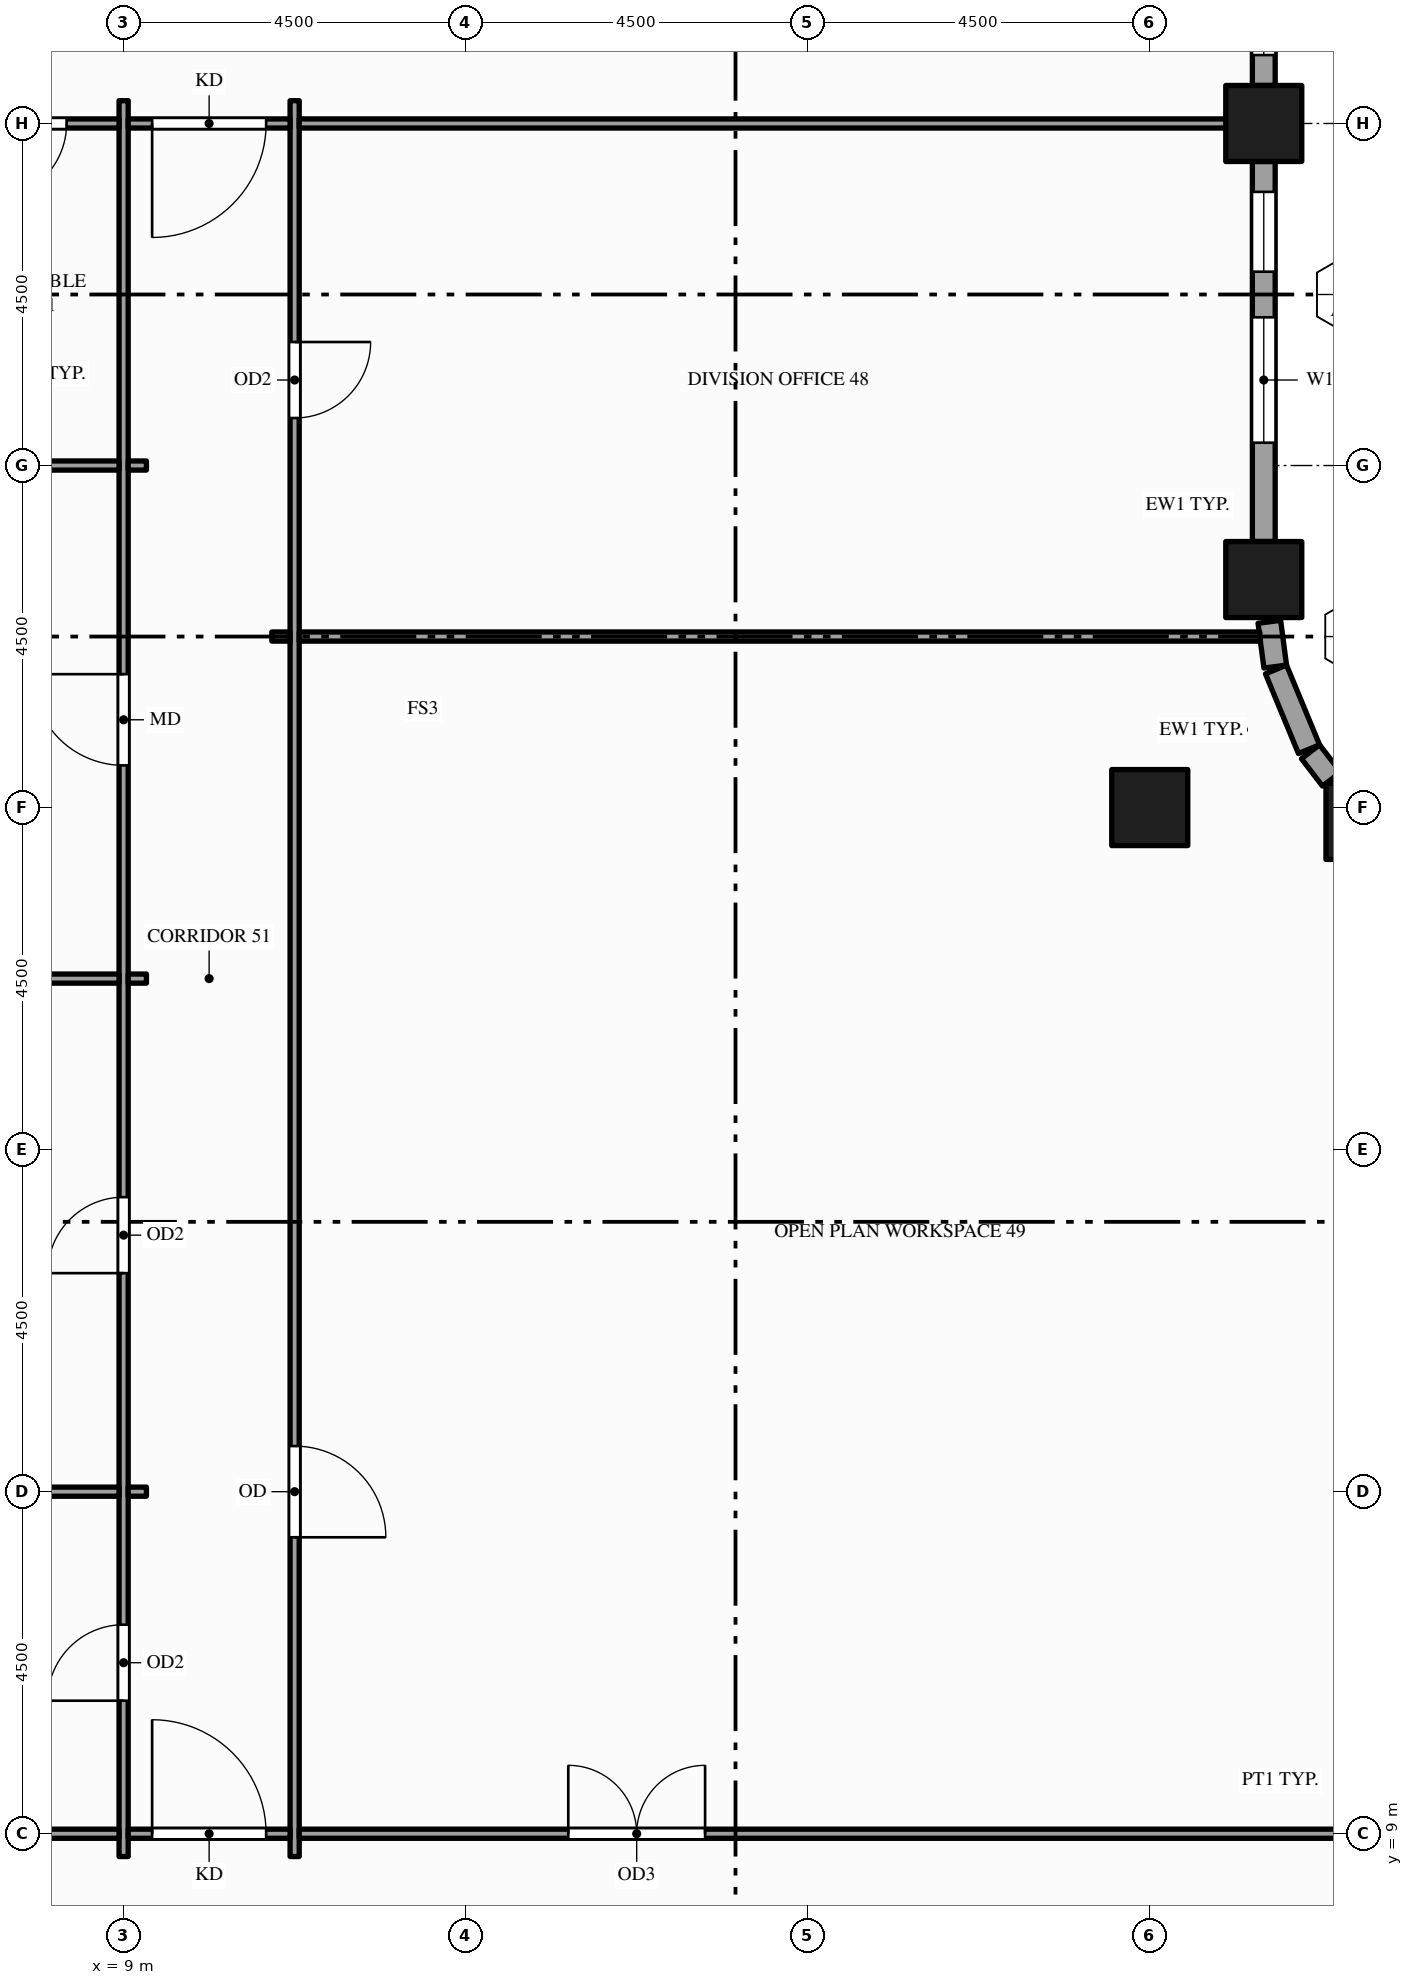
"""IFC4 building model, lengths in metres.
Left out: names, types, materials, properties, quantities, classifications, styles, units other than length and angle.
Written with IfcOpenShell. Run it as: python <this file> out.ifc"""

import sys

from ifc_helpers import new_model, si_unit, direction, frame, frame_2d, origin, origin_2d, place, context, subcontext, project, spatial, rectangle, hollow_rectangle, extrude, element, fill, save


model = new_model("IFC4")
c1 = context("Model", 3, precision=1e-05, world=origin(), true_north=direction((0.0, 1.0)))
c2 = subcontext(c1, "Body", "Model", "MODEL_VIEW")
j1 = project(units=[si_unit("LENGTHUNIT", "METRE"), si_unit("PLANEANGLEUNIT", "RADIAN")], contexts=[c1])
p1 = place(None, origin())
s1 = spatial("IfcSite", under=j1, at=p1, CompositionType="ELEMENT")
p2 = place(p1, origin())
s2 = spatial("IfcBuilding", under=s1, at=p2, CompositionType="ELEMENT")
p3 = place(p2, frame((0.0, 0.0, 103.0)))
s3 = spatial("IfcBuildingStorey", under=s2, at=p3, CompositionType="ELEMENT", Elevation=103.0)
for number, where, z_axis, x_axis in (
    (1, (22.5, 22.5, -0.15), (0.0, 0.0, 1.0), (1.0, 0.0, 0.0)),
    (2, (24.0, 25.5, -0.15), (0.0, 0.0, 1.0), (1.0, 0.0, 0.0)),
    (3, (24.0, 31.5, -0.15), (0.0, 0.0, 1.0), (1.0, 0.0, 0.0)),
    (4, (25.318, 22.318, -0.15), (0.0, 0.0, 1.0), (1.0, 0.0, 0.0)),
):
    element("IfcColumn", number, at=place(p3, frame(where, z_axis=z_axis, x_axis=x_axis)), inside=s3, PredefinedType="COLUMN", context=c2, shape_type="SweptSolid", body=[
        extrude(hollow_rectangle(XDim=1.0, YDim=1.0, WallThickness=0.05, at=origin_2d()), origin(), (0.0, 0.0, 1.0), 4.0),
    ])
p4 = place(p3, frame((24.891, 22.874, 0.0), z_axis=(0.0, 0.0, 1.0), x_axis=(-0.608488016104, 0.793563062559, 0.0)))
e5 = element("IfcWall", 5, at=p4, inside=s3, PredefinedType="STANDARD", context=c2, shape_type="SweptSolid", body=[
    extrude(rectangle(XDim=0.454, YDim=0.3, at=frame_2d((0.227, 0.0))), origin(), (0.0, 0.0, 1.0), 2.76),
])
p5 = place(p3, frame((24.595, 23.268, 0.0), z_axis=(0.0, 0.0, 1.0), x_axis=(-0.382598720491, 0.923914616768, 0.0)))
e6 = element("IfcWall", 6, at=p5, inside=s3, PredefinedType="STANDARD", context=c2, shape_type="SweptSolid", body=[
    extrude(rectangle(XDim=1.135, YDim=0.3, at=frame_2d((0.568, 0.0))), origin(), (0.0, 0.0, 1.0), 3.154),
])
p6 = place(p3, frame((24.151, 24.355, 0.0), z_axis=(0.0, 0.0, 1.0), x_axis=(-0.130709692412, 0.991420685839, 0.0)))
e7 = element("IfcWall", 7, at=p6, inside=s3, PredefinedType="STANDARD", context=c2, shape_type="SweptSolid", body=[
    extrude(rectangle(XDim=0.594, YDim=0.3, at=frame_2d((0.297, 0.0))), origin(), (0.0, 0.0, 1.0), 3.154),
])
p7 = place(p3, frame((24.0, 26.0, 0.0), z_axis=(0.0, 0.0, 1.0), x_axis=(0.0, 1.0, 0.0)))
e8 = element("IfcWall", 8, at=p7, inside=s3, PredefinedType="STANDARD", context=c2, shape_type="SweptSolid", body=[
    extrude(rectangle(XDim=5.0, YDim=0.3, at=frame_2d((2.5, 0.0))), origin(), (0.0, 0.0, 1.0), 3.154),
])
p8 = place(p7, frame((1.3, 0.0, 0.9)))
e9 = element("IfcOpeningElement", 9, at=p8, cuts=e8, PredefinedType="OPENING", context=c2, shape_type="SweptSolid", body=[
    extrude(rectangle(XDim=1.65, YDim=2.0, at=frame_2d((0.825, 1.0))), frame((0.0, 0.16, 0.0), z_axis=(0.0, -1.0, 0.0), x_axis=(1.0, 0.0, 0.0)), (0.0, 0.0, 1.0), 0.32),
])
p9 = place(p7, frame((3.55, 0.0, 0.9)))
e10 = element("IfcOpeningElement", 10, at=p9, cuts=e8, PredefinedType="OPENING", context=c2, shape_type="SweptSolid", body=[
    extrude(rectangle(XDim=1.05, YDim=2.0, at=frame_2d((0.525, 1.0))), frame((0.0, 0.16, 0.0), z_axis=(0.0, -1.0, 0.0), x_axis=(1.0, 0.0, 0.0)), (0.0, 0.0, 1.0), 0.32),
])
p10 = place(p3, frame((24.0, 32.0, 0.0), z_axis=(0.0, 0.0, 1.0), x_axis=(0.0, 1.0, 0.0)))
e11 = element("IfcWall", 11, at=p10, inside=s3, PredefinedType="STANDARD", context=c2, shape_type="SweptSolid", body=[
    extrude(rectangle(XDim=3.5, YDim=0.3, at=frame_2d((1.75, 0.0))), origin(), (0.0, 0.0, 1.0), 3.154),
])
p11 = place(p10, frame((0.4, 0.0, 0.9)))
e12 = element("IfcOpeningElement", 12, at=p11, cuts=e11, PredefinedType="OPENING", context=c2, shape_type="SweptSolid", body=[
    extrude(rectangle(XDim=1.05, YDim=2.0, at=frame_2d((0.525, 1.0))), frame((0.0, 0.16, 0.0), z_axis=(0.0, -1.0, 0.0), x_axis=(1.0, 0.0, 0.0)), (0.0, 0.0, 1.0), 0.32),
])
p12 = place(p10, frame((2.05, 0.0, 0.9)))
e13 = element("IfcOpeningElement", 13, at=p12, cuts=e11, PredefinedType="OPENING", context=c2, shape_type="SweptSolid", body=[
    extrude(rectangle(XDim=1.05, YDim=2.0, at=frame_2d((0.525, 1.0))), frame((0.0, 0.16, 0.0), z_axis=(0.0, -1.0, 0.0), x_axis=(1.0, 0.0, 0.0)), (0.0, 0.0, 1.0), 0.32),
])
p13 = place(p3, frame((9.0, 8.7, 0.0), z_axis=(0.0, 0.0, 1.0), x_axis=(0.0, 1.0, 0.0)))
e14 = element("IfcWall", 14, at=p13, inside=s3, PredefinedType="PARTITIONING", context=c2, shape_type="SweptSolid", body=[
    extrude(rectangle(XDim=23.1, YDim=0.12, at=frame_2d((11.55, 0.0))), origin(), (0.0, 0.0, 1.0), 2.6),
])
p14 = place(p13, frame((2.05, 0.0, 0.0)))
e15 = element("IfcOpeningElement", 15, at=p14, cuts=e14, PredefinedType="OPENING", context=c2, shape_type="SweptSolid", body=[
    extrude(rectangle(XDim=1.0, YDim=2.1, at=frame_2d((0.5, 1.05))), frame((0.0, 0.07, 0.0), z_axis=(0.0, -1.0, 0.0), x_axis=(1.0, 0.0, 0.0)), (0.0, 0.0, 1.0), 0.14),
])
p15 = place(p13, frame((7.675, 0.0, 0.0)))
e16 = element("IfcOpeningElement", 16, at=p15, cuts=e14, PredefinedType="OPENING", context=c2, shape_type="SweptSolid", body=[
    extrude(rectangle(XDim=1.0, YDim=2.1, at=frame_2d((0.5, 1.05))), frame((0.0, 0.07, 0.0), z_axis=(0.0, -1.0, 0.0), x_axis=(1.0, 0.0, 0.0)), (0.0, 0.0, 1.0), 0.14),
])
p16 = place(p13, frame((14.355, 0.0, 0.0)))
e17 = element("IfcOpeningElement", 17, at=p16, cuts=e14, PredefinedType="OPENING", context=c2, shape_type="SweptSolid", body=[
    extrude(rectangle(XDim=1.2, YDim=2.1, at=frame_2d((0.6, 1.05))), frame((0.0, 0.07, 0.0), z_axis=(0.0, -1.0, 0.0), x_axis=(1.0, 0.0, 0.0)), (0.0, 0.0, 1.0), 0.14),
])
p17 = place(p3, frame((11.25, 8.7, 0.0), z_axis=(0.0, 0.0, 1.0), x_axis=(0.0, 1.0, 0.0)))
e18 = element("IfcWall", 18, at=p17, inside=s3, PredefinedType="PARTITIONING", context=c2, shape_type="SweptSolid", body=[
    extrude(rectangle(XDim=23.1, YDim=0.12, at=frame_2d((11.55, 0.0))), origin(), (0.0, 0.0, 1.0), 2.6),
])
p18 = place(p17, frame((18.925, 0.0, 0.0)))
e19 = element("IfcOpeningElement", 19, at=p18, cuts=e18, PredefinedType="OPENING", context=c2, shape_type="SweptSolid", body=[
    extrude(rectangle(XDim=1.0, YDim=2.1, at=frame_2d((0.5, 1.05))), frame((0.0, 0.07, 0.0), z_axis=(0.0, -1.0, 0.0), x_axis=(1.0, 0.0, 0.0)), (0.0, 0.0, 1.0), 0.14),
])
p19 = place(p17, frame((4.2, 0.0, 0.0)))
e20 = element("IfcOpeningElement", 20, at=p19, cuts=e18, PredefinedType="OPENING", context=c2, shape_type="SweptSolid", body=[
    extrude(rectangle(XDim=1.2, YDim=2.1, at=frame_2d((0.6, 1.05))), frame((0.0, 0.07, 0.0), z_axis=(0.0, -1.0, 0.0), x_axis=(1.0, 0.0, 0.0)), (0.0, 0.0, 1.0), 0.14),
])
p20 = place(p3, frame((0.15, 9.0, 0.0), z_axis=(0.0, 0.0, 1.0), x_axis=(1.0, 0.0, 0.0)))
e21 = element("IfcWall", 21, at=p20, inside=s3, PredefinedType="PARTITIONING", context=c2, shape_type="SweptSolid", body=[
    extrude(rectangle(XDim=8.79, YDim=0.12, at=frame_2d((4.395, 0.0))), origin(), (0.0, 0.0, 1.0), 2.938),
])
p21 = place(p3, frame((9.06, 9.0, 0.0), z_axis=(0.0, 0.0, 1.0), x_axis=(1.0, 0.0, 0.0)))
e22 = element("IfcWall", 22, at=p21, inside=s3, PredefinedType="PARTITIONING", context=c2, shape_type="SweptSolid", body=[
    extrude(rectangle(XDim=2.13, YDim=0.12, at=frame_2d((1.065, 0.0))), origin(), (0.0, 0.0, 1.0), 2.938),
])
p22 = place(p21, frame((0.315, 0.0, 0.0)))
e23 = element("IfcOpeningElement", 23, at=p22, cuts=e22, PredefinedType="OPENING", context=c2, shape_type="SweptSolid", body=[
    extrude(rectangle(XDim=1.5, YDim=2.1, at=frame_2d((0.75, 1.05))), frame((0.0, 0.07, 0.0), z_axis=(0.0, -1.0, 0.0), x_axis=(1.0, 0.0, 0.0)), (0.0, 0.0, 1.0), 0.14),
])
p23 = place(p3, frame((11.31, 9.0, 0.0), z_axis=(0.0, 0.0, 1.0), x_axis=(1.0, 0.0, 0.0)))
e24 = element("IfcWall", 24, at=p23, inside=s3, PredefinedType="PARTITIONING", context=c2, shape_type="SweptSolid", body=[
    extrude(rectangle(XDim=20.13, YDim=0.12, at=frame_2d((10.065, 0.0))), origin(), (0.0, 0.0, 1.0), 2.76),
])
p24 = place(p23, frame((3.54, 0.0, 0.0)))
e25 = element("IfcOpeningElement", 25, at=p24, cuts=e24, PredefinedType="OPENING", context=c2, shape_type="SweptSolid", body=[
    extrude(rectangle(XDim=1.8, YDim=2.1, at=frame_2d((0.9, 1.05))), frame((0.0, 0.07, 0.0), z_axis=(0.0, -1.0, 0.0), x_axis=(1.0, 0.0, 0.0)), (0.0, 0.0, 1.0), 0.14),
])
p25 = place(p3, frame((0.15, 13.5, 0.0), z_axis=(0.0, 0.0, 1.0), x_axis=(1.0, 0.0, 0.0)))
e26 = element("IfcWall", 26, at=p25, inside=s3, PredefinedType="PARTITIONING", context=c2, shape_type="SweptSolid", body=[
    extrude(rectangle(XDim=8.79, YDim=0.12, at=frame_2d((4.395, 0.0))), origin(), (0.0, 0.0, 1.0), 2.938),
])
p26 = place(p3, frame((9.06, 13.5, 0.0), z_axis=(0.0, 0.0, 1.0), x_axis=(1.0, 0.0, 0.0)))
e27 = element("IfcWall", 27, at=p26, inside=s3, PredefinedType="PARTITIONING", context=c2, shape_type="SweptSolid", body=[
    extrude(rectangle(XDim=0.24, YDim=0.12, at=frame_2d((0.12, 0.0))), origin(), (0.0, 0.0, 1.0), 2.938),
])
p27 = place(p3, frame((0.15, 20.25, 0.0), z_axis=(0.0, 0.0, 1.0), x_axis=(1.0, 0.0, 0.0)))
e28 = element("IfcWall", 28, at=p27, inside=s3, PredefinedType="PARTITIONING", context=c2, shape_type="SweptSolid", body=[
    extrude(rectangle(XDim=8.79, YDim=0.12, at=frame_2d((4.395, 0.0))), origin(), (0.0, 0.0, 1.0), 2.938),
])
for number, where, z_axis, x_axis in (
    (29, (9.06, 20.25, 0.0), (0.0, 0.0, 1.0), (1.0, 0.0, 0.0)),
    (30, (10.95, 24.75, 0.0), (0.0, 0.0, 1.0), (1.0, 0.0, 0.0)),
):
    element("IfcWall", number, at=place(p3, frame(where, z_axis=z_axis, x_axis=x_axis)), inside=s3, PredefinedType="PARTITIONING", context=c2, shape_type="SweptSolid", body=[
        extrude(rectangle(XDim=0.24, YDim=0.12, at=frame_2d((0.12, 0.0))), origin(), (0.0, 0.0, 1.0), 2.938),
    ])
p28 = place(p3, frame((11.31, 24.75, 0.0), z_axis=(0.0, 0.0, 1.0), x_axis=(1.0, 0.0, 0.0)))
e31 = element("IfcWall", 31, at=p28, inside=s3, PredefinedType="PARTITIONING", context=c2, shape_type="SweptSolid", body=[
    extrude(rectangle(XDim=12.637, YDim=0.12, at=frame_2d((6.319, 0.0))), origin(), (0.0, 0.0, 1.0), 2.938),
])
p29 = place(p3, frame((6.56, 27.0, 0.0), z_axis=(0.0, 0.0, 1.0), x_axis=(1.0, 0.0, 0.0)))
e32 = element("IfcWall", 32, at=p29, inside=s3, PredefinedType="PARTITIONING", context=c2, shape_type="SweptSolid", body=[
    extrude(rectangle(XDim=2.38, YDim=0.12, at=frame_2d((1.19, 0.0))), origin(), (0.0, 0.0, 1.0), 2.938),
])
p30 = place(p3, frame((9.06, 27.0, 0.0), z_axis=(0.0, 0.0, 1.0), x_axis=(1.0, 0.0, 0.0)))
e33 = element("IfcWall", 33, at=p30, inside=s3, PredefinedType="PARTITIONING", context=c2, shape_type="SweptSolid", body=[
    extrude(rectangle(XDim=0.24, YDim=0.12, at=frame_2d((0.12, 0.0))), origin(), (0.0, 0.0, 1.0), 2.938),
])
p31 = place(p3, frame((6.56, 31.5, 0.0), z_axis=(0.0, 0.0, 1.0), x_axis=(1.0, 0.0, 0.0)))
e34 = element("IfcWall", 34, at=p31, inside=s3, PredefinedType="PARTITIONING", context=c2, shape_type="SweptSolid", body=[
    extrude(rectangle(XDim=2.38, YDim=0.12, at=frame_2d((1.19, 0.0))), origin(), (0.0, 0.0, 1.0), 2.938),
])
p32 = place(p31, frame((0.69, 0.0, 0.0)))
e35 = element("IfcOpeningElement", 35, at=p32, cuts=e34, PredefinedType="OPENING", context=c2, shape_type="SweptSolid", body=[
    extrude(rectangle(XDim=1.0, YDim=2.1, at=frame_2d((0.5, 1.05))), frame((0.0, 0.07, 0.0), z_axis=(0.0, -1.0, 0.0), x_axis=(1.0, 0.0, 0.0)), (0.0, 0.0, 1.0), 0.14),
])
p33 = place(p3, frame((9.06, 31.5, 0.0), z_axis=(0.0, 0.0, 1.0), x_axis=(1.0, 0.0, 0.0)))
e36 = element("IfcWall", 36, at=p33, inside=s3, PredefinedType="PARTITIONING", context=c2, shape_type="SweptSolid", body=[
    extrude(rectangle(XDim=2.13, YDim=0.12, at=frame_2d((1.065, 0.0))), origin(), (0.0, 0.0, 1.0), 2.938),
])
p34 = place(p33, frame((0.315, 0.0, 0.0)))
e37 = element("IfcOpeningElement", 37, at=p34, cuts=e36, PredefinedType="OPENING", context=c2, shape_type="SweptSolid", body=[
    extrude(rectangle(XDim=1.5, YDim=2.1, at=frame_2d((0.75, 1.05))), frame((0.0, 0.07, 0.0), z_axis=(0.0, -1.0, 0.0), x_axis=(1.0, 0.0, 0.0)), (0.0, 0.0, 1.0), 0.14),
])
p35 = place(p3, frame((11.31, 31.5, 0.0), z_axis=(0.0, 0.0, 1.0), x_axis=(1.0, 0.0, 0.0)))
e38 = element("IfcWall", 38, at=p35, inside=s3, PredefinedType="PARTITIONING", context=c2, shape_type="SweptSolid", body=[
    extrude(rectangle(XDim=12.54, YDim=0.12, at=frame_2d((6.27, 0.0))), origin(), (0.0, 0.0, 1.0), 2.938),
])
p36 = place(p8, origin())
e39 = element("IfcWindow", 39, at=p36, inside=s3, PartitioningType="SINGLE_PANEL", PredefinedType="WINDOW", context=c2, shape_type="SweptSolid", body=[
    extrude(rectangle(XDim=1.65, YDim=2.0, at=frame_2d((0.825, 1.0))), frame((0.0, 0.03, 0.0), z_axis=(0.0, -1.0, 0.0), x_axis=(1.0, 0.0, 0.0)), (0.0, 0.0, 1.0), 0.06),
])
fill(e9, e39)
p37 = place(p9, origin())
e40 = element("IfcWindow", 40, at=p37, inside=s3, PartitioningType="SINGLE_PANEL", PredefinedType="WINDOW", context=c2, shape_type="SweptSolid", body=[
    extrude(rectangle(XDim=1.05, YDim=2.0, at=frame_2d((0.525, 1.0))), frame((0.0, 0.03, 0.0), z_axis=(0.0, -1.0, 0.0), x_axis=(1.0, 0.0, 0.0)), (0.0, 0.0, 1.0), 0.06),
])
fill(e10, e40)
p38 = place(p11, origin())
e41 = element("IfcWindow", 41, at=p38, inside=s3, PartitioningType="SINGLE_PANEL", PredefinedType="WINDOW", context=c2, shape_type="SweptSolid", body=[
    extrude(rectangle(XDim=1.05, YDim=2.0, at=frame_2d((0.525, 1.0))), frame((0.0, 0.03, 0.0), z_axis=(0.0, -1.0, 0.0), x_axis=(1.0, 0.0, 0.0)), (0.0, 0.0, 1.0), 0.06),
])
fill(e12, e41)
p39 = place(p24, origin())
e42 = element("IfcDoor", 42, at=p39, inside=s3, OperationType="DOUBLE_DOOR_SINGLE_SWING", PredefinedType="DOOR", context=c2, shape_type="SweptSolid", body=[
    extrude(rectangle(XDim=1.8, YDim=2.1, at=frame_2d((0.9, 1.05))), frame((0.0, 0.025, 0.0), z_axis=(0.0, -1.0, 0.0), x_axis=(1.0, 0.0, 0.0)), (0.0, 0.0, 1.0), 0.05),
])
fill(e25, e42)
p40 = place(p22, origin())
e43 = element("IfcDoor", 43, at=p40, inside=s3, OperationType="SINGLE_SWING_LEFT", PredefinedType="DOOR", context=c2, shape_type="SweptSolid", body=[
    extrude(rectangle(XDim=1.5, YDim=2.1, at=frame_2d((0.75, 1.05))), frame((0.0, 0.025, 0.0), z_axis=(0.0, -1.0, 0.0), x_axis=(1.0, 0.0, 0.0)), (0.0, 0.0, 1.0), 0.05),
])
fill(e23, e43)
p41 = place(p34, origin())
e44 = element("IfcDoor", 44, at=p41, inside=s3, OperationType="SINGLE_SWING_LEFT", PredefinedType="DOOR", context=c2, shape_type="SweptSolid", body=[
    extrude(rectangle(XDim=1.5, YDim=2.1, at=frame_2d((0.75, 1.05))), frame((0.0, 0.025, 0.0), z_axis=(0.0, -1.0, 0.0), x_axis=(1.0, 0.0, 0.0)), (0.0, 0.0, 1.0), 0.05),
])
fill(e37, e44)
p42 = place(p14, origin())
e45 = element("IfcDoor", 45, at=p42, inside=s3, OperationType="SINGLE_SWING_LEFT", PredefinedType="DOOR", context=c2, shape_type="SweptSolid", body=[
    extrude(rectangle(XDim=1.0, YDim=2.1, at=frame_2d((0.5, 1.05))), frame((0.0, 0.025, 0.0), z_axis=(0.0, -1.0, 0.0), x_axis=(1.0, 0.0, 0.0)), (0.0, 0.0, 1.0), 0.05),
])
fill(e15, e45)
p43 = place(p15, origin())
e46 = element("IfcDoor", 46, at=p43, inside=s3, OperationType="SINGLE_SWING_LEFT", PredefinedType="DOOR", context=c2, shape_type="SweptSolid", body=[
    extrude(rectangle(XDim=1.0, YDim=2.1, at=frame_2d((0.5, 1.05))), frame((0.0, 0.025, 0.0), z_axis=(0.0, -1.0, 0.0), x_axis=(1.0, 0.0, 0.0)), (0.0, 0.0, 1.0), 0.05),
])
fill(e16, e46)
p44 = place(p16, origin())
e47 = element("IfcDoor", 47, at=p44, inside=s3, OperationType="SINGLE_SWING_RIGHT", PredefinedType="DOOR", context=c2, shape_type="SweptSolid", body=[
    extrude(rectangle(XDim=1.2, YDim=2.1, at=frame_2d((0.6, 1.05))), frame((0.0, 0.025, 0.0), z_axis=(0.0, -1.0, 0.0), x_axis=(1.0, 0.0, 0.0)), (0.0, 0.0, 1.0), 0.05),
])
fill(e17, e47)
p45 = place(p32, origin())
e48 = element("IfcDoor", 48, at=p45, inside=s3, OperationType="SINGLE_SWING_LEFT", PredefinedType="DOOR", context=c2, shape_type="SweptSolid", body=[
    extrude(rectangle(XDim=1.0, YDim=2.1, at=frame_2d((0.5, 1.05))), frame((0.0, 0.025, 0.0), z_axis=(0.0, -1.0, 0.0), x_axis=(1.0, 0.0, 0.0)), (0.0, 0.0, 1.0), 0.05),
])
fill(e35, e48)
p46 = place(p18, origin())
e49 = element("IfcDoor", 49, at=p46, inside=s3, OperationType="SINGLE_SWING_RIGHT", PredefinedType="DOOR", context=c2, shape_type="SweptSolid", body=[
    extrude(rectangle(XDim=1.0, YDim=2.1, at=frame_2d((0.5, 1.05))), frame((0.0, 0.025, 0.0), z_axis=(0.0, -1.0, 0.0), x_axis=(1.0, 0.0, 0.0)), (0.0, 0.0, 1.0), 0.05),
])
fill(e19, e49)
p47 = place(p19, origin())
e50 = element("IfcDoor", 50, at=p47, inside=s3, OperationType="SINGLE_SWING_LEFT", PredefinedType="DOOR", context=c2, shape_type="SweptSolid", body=[
    extrude(rectangle(XDim=1.2, YDim=2.1, at=frame_2d((0.6, 1.05))), frame((0.0, 0.025, 0.0), z_axis=(0.0, -1.0, 0.0), x_axis=(1.0, 0.0, 0.0)), (0.0, 0.0, 1.0), 0.05),
])
fill(e20, e50)
save(model, sys.argv[1])
